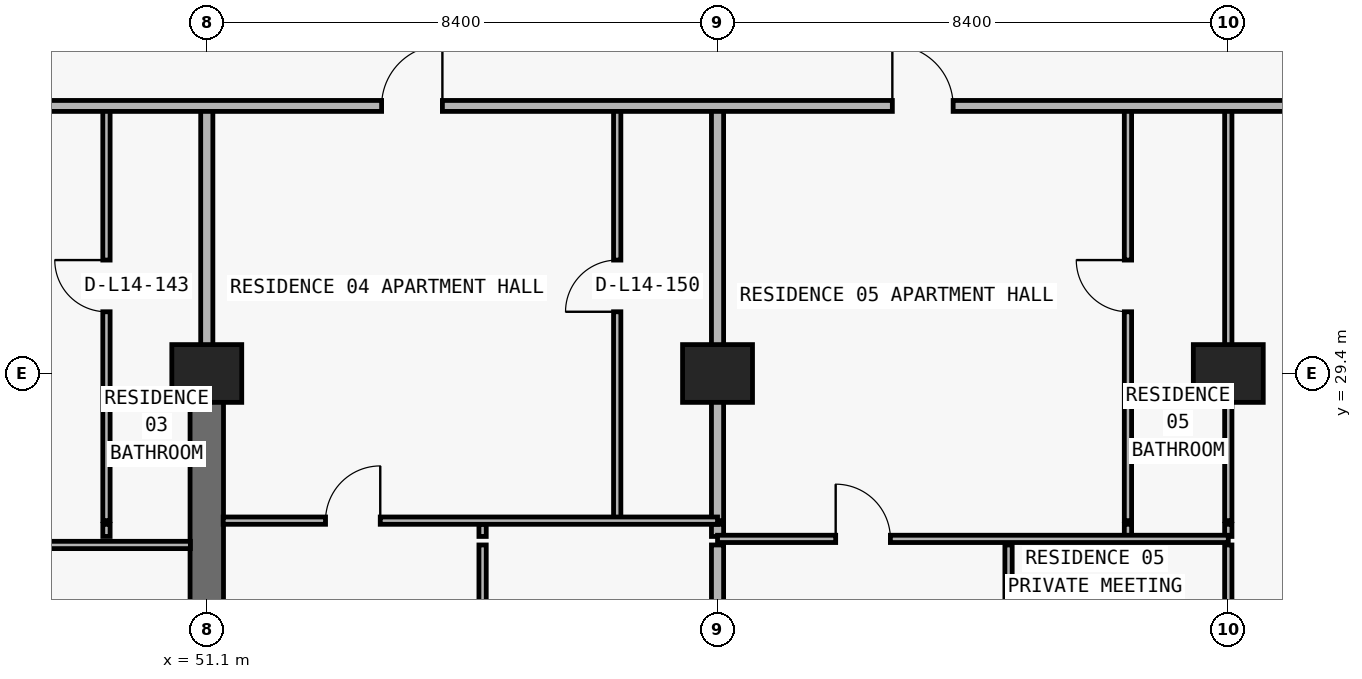
"""IFC4 building model, lengths in metres.
Left out: names, types, materials, properties, quantities, classifications, styles, units other than length and angle.
Written with IfcOpenShell. Run it as: python <this file> out.ifc"""

import sys

from ifc_helpers import new_model, si_unit, direction, frame, frame_2d, origin, origin_2d, place, context, subcontext, project, spatial, rectangle, extrude, element, fill, save


model = new_model("IFC4")
c1 = context("Model", 3, precision=1e-05, world=origin(), true_north=direction((0.0, 1.0)))
c2 = subcontext(c1, "Body", "Model", "MODEL_VIEW")
j1 = project(units=[si_unit("LENGTHUNIT", "METRE"), si_unit("PLANEANGLEUNIT", "RADIAN")], contexts=[c1])
p1 = place(None, origin())
s1 = spatial("IfcSite", under=j1, at=p1, CompositionType="ELEMENT")
p2 = place(p1, origin())
s2 = spatial("IfcBuilding", under=s1, at=p2, CompositionType="ELEMENT")
p3 = place(p2, frame((0.0, 0.0, 56.4)))
s3 = spatial("IfcBuildingStorey", under=s2, at=p3, CompositionType="ELEMENT", Elevation=56.4)
for number, where, z_axis, x_axis in (
    (1, (51.1, 29.4, 0.0), (0.0, 0.0, 1.0), (1.0, 0.0, 0.0)),
    (2, (59.5, 29.4, 0.0), (0.0, 0.0, 1.0), (1.0, 0.0, 0.0)),
    (3, (67.9, 29.4, 0.0), (0.0, 0.0, 1.0), (1.0, 0.0, 0.0)),
):
    element("IfcColumn", number, at=place(p3, frame(where, z_axis=z_axis, x_axis=x_axis)), inside=s3, PredefinedType="COLUMN", context=c2, shape_type="SweptSolid", body=[
        extrude(rectangle(XDim=1.15, YDim=0.95, at=origin_2d()), origin(), (0.0, 0.0, 1.0), 3.05),
    ])
p4 = place(p3, frame((51.1, 20.8, 0.0), z_axis=(0.0, 0.0, 1.0), x_axis=(0.0, 1.0, 0.0)))
e4 = element("IfcWall", 4, at=p4, inside=s3, PredefinedType="SHEAR", context=c2, shape_type="SweptSolid", body=[
    extrude(rectangle(XDim=8.6, YDim=0.55, at=frame_2d((4.3, 0.0))), origin(), (0.0, 0.0, 1.0), 3.05),
])
p5 = place(p3, frame((49.45, 26.72, 0.0), z_axis=(0.0, 0.0, 1.0), x_axis=(0.0, 1.0, 0.0)))
e5 = element("IfcWall", 5, at=p5, inside=s3, PredefinedType="PARTITIONING", context=c2, shape_type="SweptSolid", body=[
    extrude(rectangle(XDim=0.2, YDim=0.12, at=frame_2d((0.1, 0.0))), origin(), (0.0, 0.0, 1.0), 3.05),
])
p6 = place(p3, frame((49.45, 26.98, 0.0), z_axis=(0.0, 0.0, 1.0), x_axis=(0.0, 1.0, 0.0)))
e6 = element("IfcWall", 6, at=p6, inside=s3, PredefinedType="PARTITIONING", context=c2, shape_type="SweptSolid", body=[
    extrude(rectangle(XDim=6.82, YDim=0.12, at=frame_2d((3.41, 0.0))), origin(), (0.0, 0.0, 1.0), 3.05),
])
p7 = place(p6, frame((3.435, 0.0, 0.0)))
e7 = element("IfcOpeningElement", 7, at=p7, cuts=e6, PredefinedType="OPENING", context=c2, shape_type="SweptSolid", body=[
    extrude(rectangle(XDim=0.85, YDim=2.1, at=frame_2d((0.425, 1.05))), frame((0.0, 0.07, 0.0), z_axis=(0.0, -1.0, 0.0), x_axis=(1.0, 0.0, 0.0)), (0.0, 0.0, 1.0), 0.14),
])
p8 = place(p3, frame((51.1, 29.405, 0.0), z_axis=(0.0, 0.0, 1.0), x_axis=(0.0, 1.0, 0.0)))
e8 = element("IfcWall", 8, at=p8, inside=s3, PredefinedType="PARTITIONING", context=c2, shape_type="SweptSolid", body=[
    extrude(rectangle(XDim=4.395, YDim=0.2, at=frame_2d((2.198, 0.0))), origin(), (0.0, 0.0, 1.0), 2.335),
])
p9 = place(p3, frame((55.636, 22.2, 0.0), z_axis=(0.0, 0.0, 1.0), x_axis=(0.0, 1.0, 0.0)))
e9 = element("IfcWall", 9, at=p9, inside=s3, PredefinedType="PARTITIONING", context=c2, shape_type="SweptSolid", body=[
    extrude(rectangle(XDim=4.38, YDim=0.12, at=frame_2d((2.19, 0.0))), origin(), (0.0, 0.0, 1.0), 3.05),
])
p10 = place(p9, frame((1.74, 0.0, 0.0)))
e10 = element("IfcOpeningElement", 10, at=p10, cuts=e9, PredefinedType="OPENING", context=c2, shape_type="SweptSolid", body=[
    extrude(rectangle(XDim=0.9, YDim=2.15, at=frame_2d((0.45, 1.075))), frame((0.0, 0.07, 0.0), z_axis=(0.0, -1.0, 0.0), x_axis=(1.0, 0.0, 0.0)), (0.0, 0.0, 1.0), 0.14),
])
p11 = place(p3, frame((55.636, 26.72, 0.0), z_axis=(0.0, 0.0, 1.0), x_axis=(0.0, 1.0, 0.0)))
e11 = element("IfcWall", 11, at=p11, inside=s3, PredefinedType="PARTITIONING", context=c2, shape_type="SweptSolid", body=[
    extrude(rectangle(XDim=0.2, YDim=0.12, at=frame_2d((0.1, 0.0))), origin(), (0.0, 0.0, 1.0), 3.05),
])
p12 = place(p3, frame((57.85, 26.98, 0.0), z_axis=(0.0, 0.0, 1.0), x_axis=(0.0, 1.0, 0.0)))
e12 = element("IfcWall", 12, at=p12, inside=s3, PredefinedType="PARTITIONING", context=c2, shape_type="SweptSolid", body=[
    extrude(rectangle(XDim=6.82, YDim=0.12, at=frame_2d((3.41, 0.0))), origin(), (0.0, 0.0, 1.0), 3.05),
])
p13 = place(p12, frame((3.435, 0.0, 0.0)))
e13 = element("IfcOpeningElement", 13, at=p13, cuts=e12, PredefinedType="OPENING", context=c2, shape_type="SweptSolid", body=[
    extrude(rectangle(XDim=0.85, YDim=2.1, at=frame_2d((0.425, 1.05))), frame((0.0, 0.07, 0.0), z_axis=(0.0, -1.0, 0.0), x_axis=(1.0, 0.0, 0.0)), (0.0, 0.0, 1.0), 0.14),
])
p14 = place(p3, frame((59.5, 22.2, 0.0), z_axis=(0.0, 0.0, 1.0), x_axis=(0.0, 1.0, 0.0)))
e14 = element("IfcWall", 14, at=p14, inside=s3, PredefinedType="PARTITIONING", context=c2, shape_type="SweptSolid", body=[
    extrude(rectangle(XDim=4.38, YDim=0.2, at=frame_2d((2.19, 0.0))), origin(), (0.0, 0.0, 1.0), 2.11),
])
p15 = place(p3, frame((59.5, 26.72, 0.0), z_axis=(0.0, 0.0, 1.0), x_axis=(0.0, 1.0, 0.0)))
e15 = element("IfcWall", 15, at=p15, inside=s3, PredefinedType="PARTITIONING", context=c2, shape_type="SweptSolid", body=[
    extrude(rectangle(XDim=0.2, YDim=0.2, at=frame_2d((0.1, 0.0))), origin(), (0.0, 0.0, 1.0), 2.11),
])
p16 = place(p3, frame((59.5, 26.98, 0.0), z_axis=(0.0, 0.0, 1.0), x_axis=(0.0, 1.0, 0.0)))
e16 = element("IfcWall", 16, at=p16, inside=s3, PredefinedType="PARTITIONING", context=c2, shape_type="SweptSolid", body=[
    extrude(rectangle(XDim=6.82, YDim=0.2, at=frame_2d((3.41, 0.0))), origin(), (0.0, 0.0, 1.0), 2.11),
])
p17 = place(p3, frame((64.286, 22.2, 0.0), z_axis=(0.0, 0.0, 1.0), x_axis=(0.0, 1.0, 0.0)))
e17 = element("IfcWall", 17, at=p17, inside=s3, PredefinedType="PARTITIONING", context=c2, shape_type="SweptSolid", body=[
    extrude(rectangle(XDim=4.38, YDim=0.12, at=frame_2d((2.19, 0.0))), origin(), (0.0, 0.0, 1.0), 3.05),
])
p18 = place(p17, frame((1.74, 0.0, 0.0)))
e18 = element("IfcOpeningElement", 18, at=p18, cuts=e17, PredefinedType="OPENING", context=c2, shape_type="SweptSolid", body=[
    extrude(rectangle(XDim=0.9, YDim=2.15, at=frame_2d((0.45, 1.075))), frame((0.0, 0.07, 0.0), z_axis=(0.0, -1.0, 0.0), x_axis=(1.0, 0.0, 0.0)), (0.0, 0.0, 1.0), 0.14),
])
p19 = place(p3, frame((66.25, 26.72, 0.0), z_axis=(0.0, 0.0, 1.0), x_axis=(0.0, 1.0, 0.0)))
e19 = element("IfcWall", 19, at=p19, inside=s3, PredefinedType="PARTITIONING", context=c2, shape_type="SweptSolid", body=[
    extrude(rectangle(XDim=0.2, YDim=0.12, at=frame_2d((0.1, 0.0))), origin(), (0.0, 0.0, 1.0), 3.05),
])
p20 = place(p3, frame((66.25, 26.98, 0.0), z_axis=(0.0, 0.0, 1.0), x_axis=(0.0, 1.0, 0.0)))
e20 = element("IfcWall", 20, at=p20, inside=s3, PredefinedType="PARTITIONING", context=c2, shape_type="SweptSolid", body=[
    extrude(rectangle(XDim=6.82, YDim=0.12, at=frame_2d((3.41, 0.0))), origin(), (0.0, 0.0, 1.0), 3.05),
])
p21 = place(p20, frame((3.435, 0.0, 0.0)))
e21 = element("IfcOpeningElement", 21, at=p21, cuts=e20, PredefinedType="OPENING", context=c2, shape_type="SweptSolid", body=[
    extrude(rectangle(XDim=0.85, YDim=2.1, at=frame_2d((0.425, 1.05))), frame((0.0, 0.07, 0.0), z_axis=(0.0, -1.0, 0.0), x_axis=(1.0, 0.0, 0.0)), (0.0, 0.0, 1.0), 0.14),
])
p22 = place(p3, frame((67.9, 22.2, 0.0), z_axis=(0.0, 0.0, 1.0), x_axis=(0.0, 1.0, 0.0)))
e22 = element("IfcWall", 22, at=p22, inside=s3, PredefinedType="PARTITIONING", context=c2, shape_type="SweptSolid", body=[
    extrude(rectangle(XDim=4.38, YDim=0.12, at=frame_2d((2.19, 0.0))), origin(), (0.0, 0.0, 1.0), 2.11),
])
p23 = place(p22, frame((1.74, 0.0, 0.0)))
e23 = element("IfcOpeningElement", 23, at=p23, cuts=e22, PredefinedType="OPENING", context=c2, shape_type="SweptSolid", body=[
    extrude(rectangle(XDim=0.9, YDim=2.06, at=frame_2d((0.45, 1.03))), frame((0.0, 0.07, 0.0), z_axis=(0.0, -1.0, 0.0), x_axis=(1.0, 0.0, 0.0)), (0.0, 0.0, 1.0), 0.14),
])
p24 = place(p3, frame((67.9, 26.72, 0.0), z_axis=(0.0, 0.0, 1.0), x_axis=(0.0, 1.0, 0.0)))
e24 = element("IfcWall", 24, at=p24, inside=s3, PredefinedType="PARTITIONING", context=c2, shape_type="SweptSolid", body=[
    extrude(rectangle(XDim=0.2, YDim=0.12, at=frame_2d((0.1, 0.0))), origin(), (0.0, 0.0, 1.0), 2.11),
])
p25 = place(p3, frame((67.9, 26.98, 0.0), z_axis=(0.0, 0.0, 1.0), x_axis=(0.0, 1.0, 0.0)))
e25 = element("IfcWall", 25, at=p25, inside=s3, PredefinedType="PARTITIONING", context=c2, shape_type="SweptSolid", body=[
    extrude(rectangle(XDim=6.82, YDim=0.12, at=frame_2d((3.41, 0.0))), origin(), (0.0, 0.0, 1.0), 2.11),
])
p26 = place(p3, frame((42.7, 26.58, 0.0), z_axis=(0.0, 0.0, 1.0), x_axis=(1.0, 0.0, 0.0)))
e26 = element("IfcWall", 26, at=p26, inside=s3, PredefinedType="PARTITIONING", context=c2, shape_type="SweptSolid", body=[
    extrude(rectangle(XDim=8.13, YDim=0.12, at=frame_2d((4.065, 0.0))), origin(), (0.0, 0.0, 1.0), 3.05),
])
p27 = place(p26, frame((1.693, 0.0, 0.0)))
e27 = element("IfcOpeningElement", 27, at=p27, cuts=e26, PredefinedType="OPENING", context=c2, shape_type="SweptSolid", body=[
    extrude(rectangle(XDim=0.9, YDim=2.15, at=frame_2d((0.45, 1.075))), frame((0.0, 0.07, 0.0), z_axis=(0.0, -1.0, 0.0), x_axis=(1.0, 0.0, 0.0)), (0.0, 0.0, 1.0), 0.14),
])
p28 = place(p3, frame((59.5, 26.68, 0.0), z_axis=(0.0, 0.0, 1.0), x_axis=(1.0, 0.0, 0.0)))
e28 = element("IfcWall", 28, at=p28, inside=s3, PredefinedType="PARTITIONING", context=c2, shape_type="SweptSolid", body=[
    extrude(rectangle(XDim=8.4, YDim=0.12, at=frame_2d((4.2, 0.0))), origin(), (0.0, 0.0, 1.0), 3.05),
])
p29 = place(p28, frame((1.943, 0.0, 0.0)))
e29 = element("IfcOpeningElement", 29, at=p29, cuts=e28, PredefinedType="OPENING", context=c2, shape_type="SweptSolid", body=[
    extrude(rectangle(XDim=0.9, YDim=2.15, at=frame_2d((0.45, 1.075))), frame((0.0, 0.07, 0.0), z_axis=(0.0, -1.0, 0.0), x_axis=(1.0, 0.0, 0.0)), (0.0, 0.0, 1.0), 0.14),
])
p30 = place(p3, frame((51.37, 26.98, 0.0), z_axis=(0.0, 0.0, 1.0), x_axis=(1.0, 0.0, 0.0)))
e30 = element("IfcWall", 30, at=p30, inside=s3, PredefinedType="PARTITIONING", context=c2, shape_type="SweptSolid", body=[
    extrude(rectangle(XDim=8.13, YDim=0.12, at=frame_2d((4.065, 0.0))), origin(), (0.0, 0.0, 1.0), 3.05),
])
p31 = place(p30, frame((1.683, 0.0, 0.0)))
e31 = element("IfcOpeningElement", 31, at=p31, cuts=e30, PredefinedType="OPENING", context=c2, shape_type="SweptSolid", body=[
    extrude(rectangle(XDim=0.9, YDim=2.15, at=frame_2d((0.45, 1.075))), frame((0.0, 0.07, 0.0), z_axis=(0.0, -1.0, 0.0), x_axis=(1.0, 0.0, 0.0)), (0.0, 0.0, 1.0), 0.14),
])
p32 = place(p3, frame((5.105, 33.8, 0.0), z_axis=(0.0, 0.0, 1.0), x_axis=(1.0, 0.0, 0.0)))
e32 = element("IfcWall", 32, at=p32, inside=s3, PredefinedType="PARTITIONING", context=c2, shape_type="SweptSolid", body=[
    extrude(rectangle(XDim=67.595, YDim=0.18, at=frame_2d((33.797, 0.0))), origin(), (0.0, 0.0, 1.0), 3.05),
])
p33 = place(p32, frame((7.745, 0.0, 0.0)))
e33 = element("IfcOpeningElement", 33, at=p33, cuts=e32, PredefinedType="OPENING", context=c2, shape_type="SweptSolid", body=[
    extrude(rectangle(XDim=1.0, YDim=2.2, at=frame_2d((0.5, 1.1))), frame((0.0, 0.1, 0.0), z_axis=(0.0, -1.0, 0.0), x_axis=(1.0, 0.0, 0.0)), (0.0, 0.0, 1.0), 0.2),
])
p34 = place(p32, frame((24.545, 0.0, 0.0)))
e34 = element("IfcOpeningElement", 34, at=p34, cuts=e32, PredefinedType="OPENING", context=c2, shape_type="SweptSolid", body=[
    extrude(rectangle(XDim=1.0, YDim=2.2, at=frame_2d((0.5, 1.1))), frame((0.0, 0.1, 0.0), z_axis=(0.0, -1.0, 0.0), x_axis=(1.0, 0.0, 0.0)), (0.0, 0.0, 1.0), 0.2),
])
p35 = place(p32, frame((40.47, 0.0, 0.0)))
e35 = element("IfcOpeningElement", 35, at=p35, cuts=e32, PredefinedType="OPENING", context=c2, shape_type="SweptSolid", body=[
    extrude(rectangle(XDim=1.0, YDim=2.2, at=frame_2d((0.5, 1.1))), frame((0.0, 0.1, 0.0), z_axis=(0.0, -1.0, 0.0), x_axis=(1.0, 0.0, 0.0)), (0.0, 0.0, 1.0), 0.2),
])
p36 = place(p32, frame((48.87, 0.0, 0.0)))
e36 = element("IfcOpeningElement", 36, at=p36, cuts=e32, PredefinedType="OPENING", context=c2, shape_type="SweptSolid", body=[
    extrude(rectangle(XDim=1.0, YDim=2.2, at=frame_2d((0.5, 1.1))), frame((0.0, 0.1, 0.0), z_axis=(0.0, -1.0, 0.0), x_axis=(1.0, 0.0, 0.0)), (0.0, 0.0, 1.0), 0.2),
])
p37 = place(p32, frame((57.27, 0.0, 0.0)))
e37 = element("IfcOpeningElement", 37, at=p37, cuts=e32, PredefinedType="OPENING", context=c2, shape_type="SweptSolid", body=[
    extrude(rectangle(XDim=1.0, YDim=2.2, at=frame_2d((0.5, 1.1))), frame((0.0, 0.1, 0.0), z_axis=(0.0, -1.0, 0.0), x_axis=(1.0, 0.0, 0.0)), (0.0, 0.0, 1.0), 0.2),
])
p38 = place(p7, origin())
e38 = element("IfcDoor", 38, at=p38, inside=s3, OperationType="SINGLE_SWING_RIGHT", PredefinedType="DOOR", context=c2, shape_type="SweptSolid", body=[
    extrude(rectangle(XDim=0.85, YDim=2.1, at=frame_2d((0.425, 1.05))), frame((0.0, 0.025, 0.0), z_axis=(0.0, -1.0, 0.0), x_axis=(1.0, 0.0, 0.0)), (0.0, 0.0, 1.0), 0.05),
])
fill(e7, e38)
p39 = place(p36, origin())
e39 = element("IfcDoor", 39, at=p39, inside=s3, OperationType="SINGLE_SWING_RIGHT", PredefinedType="DOOR", context=c2, shape_type="SweptSolid", body=[
    extrude(rectangle(XDim=1.0, YDim=2.2, at=frame_2d((0.5, 1.1))), frame((0.0, 0.025, 0.0), z_axis=(0.0, -1.0, 0.0), x_axis=(1.0, 0.0, 0.0)), (0.0, 0.0, 1.0), 0.05),
])
fill(e36, e39)
p40 = place(p13, origin())
e40 = element("IfcDoor", 40, at=p40, inside=s3, OperationType="SINGLE_SWING_LEFT", PredefinedType="DOOR", context=c2, shape_type="SweptSolid", body=[
    extrude(rectangle(XDim=0.85, YDim=2.1, at=frame_2d((0.425, 1.05))), frame((0.0, 0.025, 0.0), z_axis=(0.0, -1.0, 0.0), x_axis=(1.0, 0.0, 0.0)), (0.0, 0.0, 1.0), 0.05),
])
fill(e13, e40)
p41 = place(p31, origin())
e41 = element("IfcDoor", 41, at=p41, inside=s3, OperationType="SINGLE_SWING_RIGHT", PredefinedType="DOOR", context=c2, shape_type="SweptSolid", body=[
    extrude(rectangle(XDim=0.9, YDim=2.15, at=frame_2d((0.45, 1.075))), frame((0.0, 0.025, 0.0), z_axis=(0.0, -1.0, 0.0), x_axis=(1.0, 0.0, 0.0)), (0.0, 0.0, 1.0), 0.05),
])
fill(e31, e41)
p42 = place(p37, origin())
e42 = element("IfcDoor", 42, at=p42, inside=s3, OperationType="SINGLE_SWING_LEFT", PredefinedType="DOOR", context=c2, shape_type="SweptSolid", body=[
    extrude(rectangle(XDim=1.0, YDim=2.2, at=frame_2d((0.5, 1.1))), frame((0.0, 0.025, 0.0), z_axis=(0.0, -1.0, 0.0), x_axis=(1.0, 0.0, 0.0)), (0.0, 0.0, 1.0), 0.05),
])
fill(e37, e42)
p43 = place(p21, origin())
e43 = element("IfcDoor", 43, at=p43, inside=s3, OperationType="SINGLE_SWING_RIGHT", PredefinedType="DOOR", context=c2, shape_type="SweptSolid", body=[
    extrude(rectangle(XDim=0.85, YDim=2.1, at=frame_2d((0.425, 1.05))), frame((0.0, 0.025, 0.0), z_axis=(0.0, -1.0, 0.0), x_axis=(1.0, 0.0, 0.0)), (0.0, 0.0, 1.0), 0.05),
])
fill(e21, e43)
p44 = place(p29, origin())
e44 = element("IfcDoor", 44, at=p44, inside=s3, OperationType="SINGLE_SWING_LEFT", PredefinedType="DOOR", context=c2, shape_type="SweptSolid", body=[
    extrude(rectangle(XDim=0.9, YDim=2.15, at=frame_2d((0.45, 1.075))), frame((0.0, 0.025, 0.0), z_axis=(0.0, -1.0, 0.0), x_axis=(1.0, 0.0, 0.0)), (0.0, 0.0, 1.0), 0.05),
])
fill(e29, e44)
save(model, sys.argv[1])
